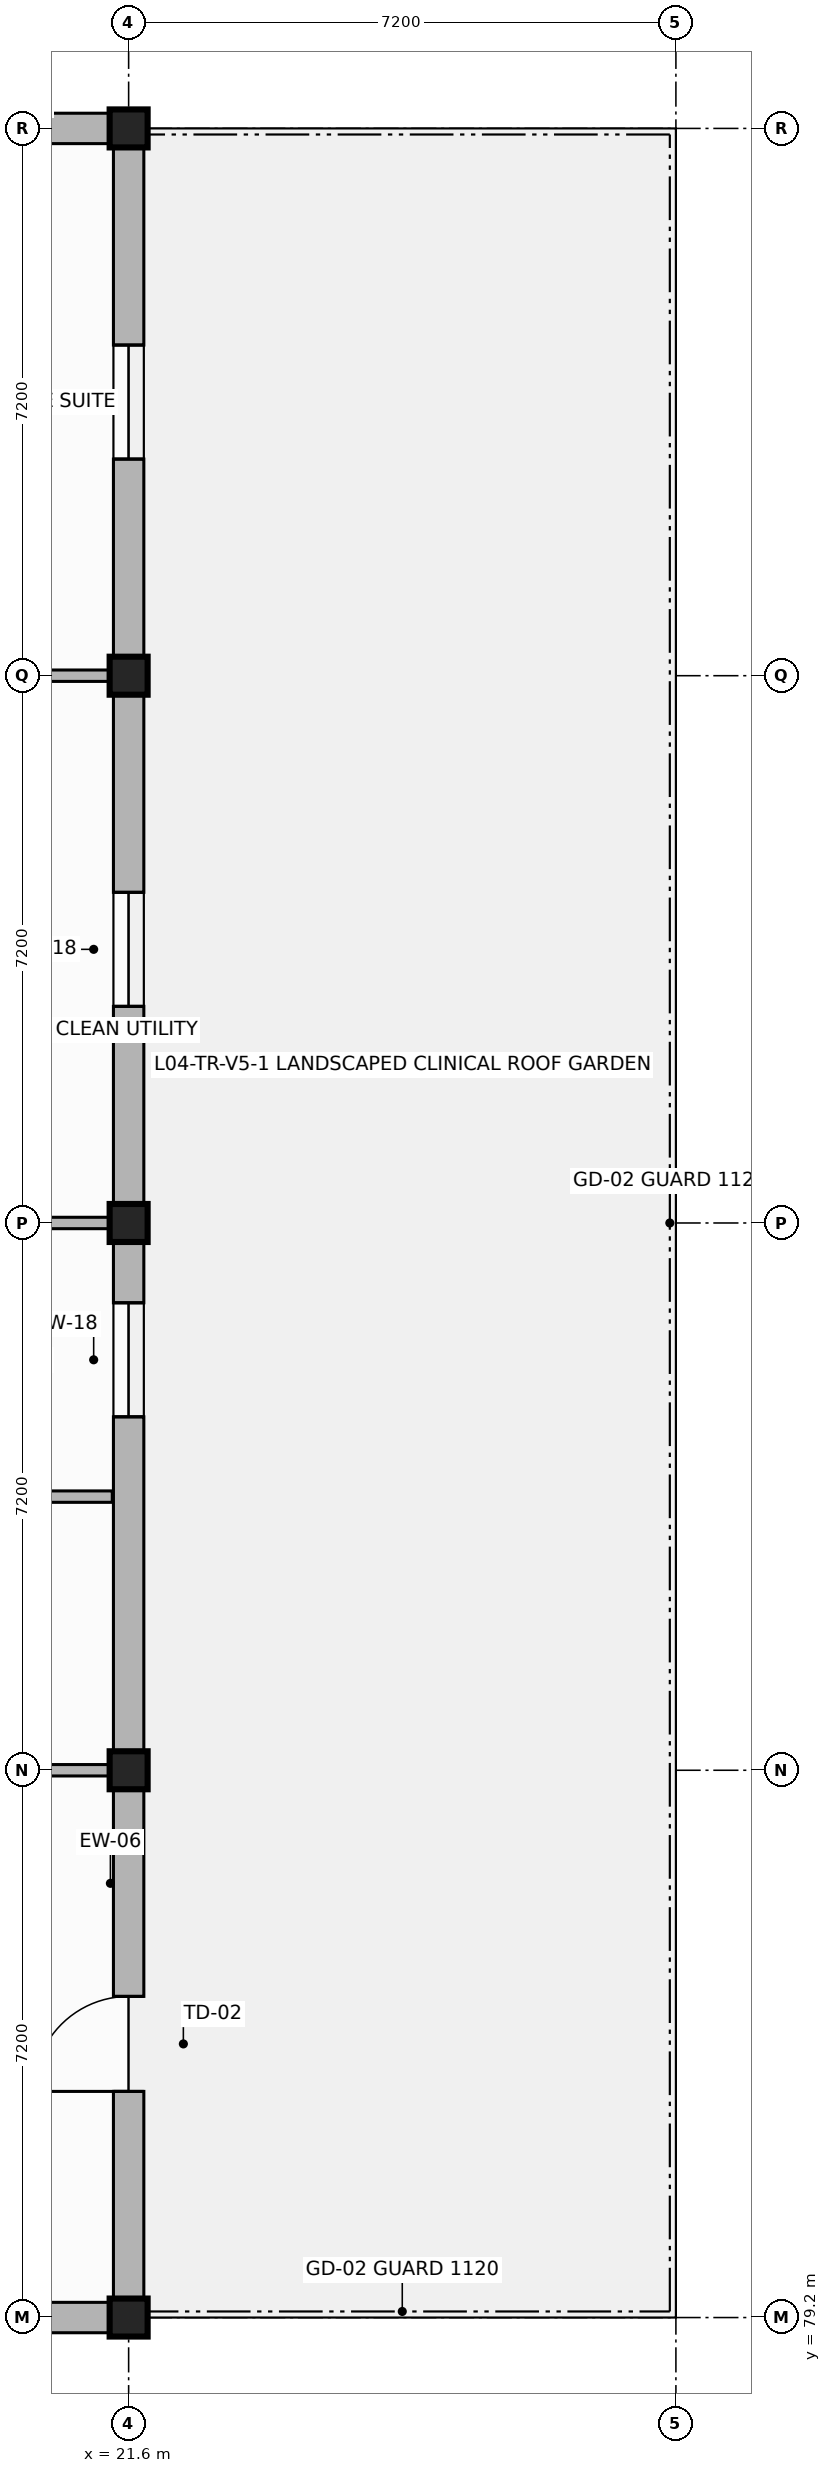
"""IFC4 building model, lengths in metres.
Left out: names, types, materials, properties, quantities, classifications, styles, units other than length and angle.
Written with IfcOpenShell. Run it as: python <this file> out.ifc"""

import sys

from ifc_helpers import new_model, si_unit, direction, frame, frame_2d, origin, origin_2d, place, context, subcontext, project, spatial, rectangle, extrude, element, fill, save


model = new_model("IFC4")
c1 = context("Model", 3, precision=1e-05, world=origin(), true_north=direction((0.0, 1.0)))
c2 = subcontext(c1, "Body", "Model", "MODEL_VIEW")
j1 = project(units=[si_unit("LENGTHUNIT", "METRE"), si_unit("PLANEANGLEUNIT", "RADIAN")], contexts=[c1])
p1 = place(None, origin())
s1 = spatial("IfcSite", under=j1, at=p1, CompositionType="ELEMENT")
p2 = place(p1, origin())
s2 = spatial("IfcBuilding", under=s1, at=p2, CompositionType="ELEMENT")
p3 = place(p2, frame((0.0, 0.0, 16.0)))
s3 = spatial("IfcBuildingStorey", under=s2, at=p3, CompositionType="ELEMENT", Elevation=16.0)
for number, where, z_axis, x_axis in (
    (1, (21.6, 79.2, 0.0), (0.0, 0.0, 1.0), (1.0, 0.0, 0.0)),
    (2, (21.6, 86.4, 0.0), (0.0, 0.0, 1.0), (1.0, 0.0, 0.0)),
    (3, (21.6, 93.6, 0.0), (0.0, 0.0, 1.0), (1.0, 0.0, 0.0)),
    (4, (21.6, 100.8, 0.0), (0.0, 0.0, 1.0), (1.0, 0.0, 0.0)),
    (5, (21.6, 108.0, 0.0), (0.0, 0.0, 1.0), (1.0, 0.0, 0.0)),
):
    element("IfcColumn", number, at=place(p3, frame(where, z_axis=z_axis, x_axis=x_axis)), inside=s3, PredefinedType="COLUMN", context=c2, shape_type="SweptSolid", body=[
        extrude(rectangle(XDim=0.5, YDim=0.5, at=origin_2d()), origin(), (0.0, 0.0, 1.0), 3.46),
    ])
p4 = place(p3, frame((14.4, 79.2, 0.0), z_axis=(0.0, 0.0, 1.0), x_axis=(1.0, 0.0, 0.0)))
e6 = element("IfcWall", 6, at=p4, inside=s3, PredefinedType="SOLIDWALL", context=c2, shape_type="SweptSolid", body=[
    extrude(rectangle(XDim=7.2, YDim=0.4, at=frame_2d((3.6, 0.0))), origin(), (0.0, 0.0, 1.0), 2.79),
])
p5 = place(p4, frame((2.85, 0.0, 0.9)))
e7 = element("IfcOpeningElement", 7, at=p5, cuts=e6, PredefinedType="OPENING", context=c2, shape_type="SweptSolid", body=[
    extrude(rectangle(XDim=1.5, YDim=1.6, at=frame_2d((0.75, 0.8))), frame((0.0, 0.21, 0.0), z_axis=(0.0, -1.0, 0.0), x_axis=(1.0, 0.0, 0.0)), (0.0, 0.0, 1.0), 0.42),
])
p6 = place(p3, frame((21.6, 79.2, 0.0), z_axis=(0.0, 0.0, 1.0), x_axis=(0.0, 1.0, 0.0)))
e8 = element("IfcWall", 8, at=p6, inside=s3, PredefinedType="SOLIDWALL", context=c2, shape_type="SweptSolid", body=[
    extrude(rectangle(XDim=7.2, YDim=0.4, at=frame_2d((3.6, 0.0))), origin(), (0.0, 0.0, 1.0), 2.79),
])
p7 = place(p6, frame((2.975, 0.0, 0.0)))
e9 = element("IfcOpeningElement", 9, at=p7, cuts=e8, PredefinedType="OPENING", context=c2, shape_type="SweptSolid", body=[
    extrude(rectangle(XDim=1.25, YDim=2.25, at=frame_2d((0.625, 1.125))), frame((0.0, 0.21, 0.0), z_axis=(0.0, -1.0, 0.0), x_axis=(1.0, 0.0, 0.0)), (0.0, 0.0, 1.0), 0.42),
])
p8 = place(p3, frame((21.6, 86.4, 0.0), z_axis=(0.0, 0.0, 1.0), x_axis=(0.0, 1.0, 0.0)))
e10 = element("IfcWall", 10, at=p8, inside=s3, PredefinedType="SOLIDWALL", context=c2, shape_type="SweptSolid", body=[
    extrude(rectangle(XDim=7.2, YDim=0.4, at=frame_2d((3.6, 0.0))), origin(), (0.0, 0.0, 1.0), 2.79),
])
p9 = place(p8, frame((4.65, 0.0, 0.9)))
e11 = element("IfcOpeningElement", 11, at=p9, cuts=e10, PredefinedType="OPENING", context=c2, shape_type="SweptSolid", body=[
    extrude(rectangle(XDim=1.5, YDim=1.6, at=frame_2d((0.75, 0.8))), frame((0.0, 0.21, 0.0), z_axis=(0.0, -1.0, 0.0), x_axis=(1.0, 0.0, 0.0)), (0.0, 0.0, 1.0), 0.42),
])
p10 = place(p3, frame((21.6, 93.6, 0.0), z_axis=(0.0, 0.0, 1.0), x_axis=(0.0, 1.0, 0.0)))
e12 = element("IfcWall", 12, at=p10, inside=s3, PredefinedType="SOLIDWALL", context=c2, shape_type="SweptSolid", body=[
    extrude(rectangle(XDim=7.2, YDim=0.4, at=frame_2d((3.6, 0.0))), origin(), (0.0, 0.0, 1.0), 2.79),
])
p11 = place(p10, frame((2.85, 0.0, 0.9)))
e13 = element("IfcOpeningElement", 13, at=p11, cuts=e12, PredefinedType="OPENING", context=c2, shape_type="SweptSolid", body=[
    extrude(rectangle(XDim=1.5, YDim=1.6, at=frame_2d((0.75, 0.8))), frame((0.0, 0.21, 0.0), z_axis=(0.0, -1.0, 0.0), x_axis=(1.0, 0.0, 0.0)), (0.0, 0.0, 1.0), 0.42),
])
p12 = place(p3, frame((21.6, 100.8, 0.0), z_axis=(0.0, 0.0, 1.0), x_axis=(0.0, 1.0, 0.0)))
e14 = element("IfcWall", 14, at=p12, inside=s3, PredefinedType="SOLIDWALL", context=c2, shape_type="SweptSolid", body=[
    extrude(rectangle(XDim=7.2, YDim=0.4, at=frame_2d((3.6, 0.0))), origin(), (0.0, 0.0, 1.0), 2.79),
])
p13 = place(p12, frame((2.85, 0.0, 0.9)))
e15 = element("IfcOpeningElement", 15, at=p13, cuts=e14, PredefinedType="OPENING", context=c2, shape_type="SweptSolid", body=[
    extrude(rectangle(XDim=1.5, YDim=1.6, at=frame_2d((0.75, 0.8))), frame((0.0, 0.21, 0.0), z_axis=(0.0, -1.0, 0.0), x_axis=(1.0, 0.0, 0.0)), (0.0, 0.0, 1.0), 0.42),
])
p14 = place(p3, frame((21.6, 108.0, 0.0), z_axis=(0.0, 0.0, 1.0), x_axis=(-1.0, 0.0, 0.0)))
e16 = element("IfcWall", 16, at=p14, inside=s3, PredefinedType="SOLIDWALL", context=c2, shape_type="SweptSolid", body=[
    extrude(rectangle(XDim=7.2, YDim=0.4, at=frame_2d((3.6, 0.0))), origin(), (0.0, 0.0, 1.0), 2.79),
])
p15 = place(p14, frame((2.85, 0.0, 0.9)))
e17 = element("IfcOpeningElement", 17, at=p15, cuts=e16, PredefinedType="OPENING", context=c2, shape_type="SweptSolid", body=[
    extrude(rectangle(XDim=1.5, YDim=1.6, at=frame_2d((0.75, 0.8))), frame((0.0, 0.21, 0.0), z_axis=(0.0, -1.0, 0.0), x_axis=(1.0, 0.0, 0.0)), (0.0, 0.0, 1.0), 0.42),
])
for number, where, z_axis, x_axis in (
    (18, (13.294, 86.4, 0.0), (0.0, 0.0, 1.0), (1.0, 0.0, 0.0)),
    (19, (13.294, 90.0, 0.0), (0.0, 0.0, 1.0), (1.0, 0.0, 0.0)),
):
    element("IfcWall", number, at=place(p3, frame(where, z_axis=z_axis, x_axis=x_axis)), inside=s3, PredefinedType="PARTITIONING", context=c2, shape_type="SweptSolid", body=[
        extrude(rectangle(XDim=8.091, YDim=0.15, at=frame_2d((4.045, 0.0))), origin(), (0.0, 0.0, 1.0), 2.78),
    ])
p16 = place(p3, frame((16.812, 93.6, 0.0), z_axis=(0.0, 0.0, 1.0), x_axis=(1.0, 0.0, 0.0)))
e20 = element("IfcWall", 20, at=p16, inside=s3, PredefinedType="PARTITIONING", context=c2, shape_type="SweptSolid", body=[
    extrude(rectangle(XDim=4.573, YDim=0.15, at=frame_2d((2.287, 0.0))), origin(), (0.0, 0.0, 1.0), 2.78),
])
p17 = place(p3, frame((13.294, 100.8, 0.0), z_axis=(0.0, 0.0, 1.0), x_axis=(1.0, 0.0, 0.0)))
e21 = element("IfcWall", 21, at=p17, inside=s3, PredefinedType="PARTITIONING", context=c2, shape_type="SweptSolid", body=[
    extrude(rectangle(XDim=8.091, YDim=0.15, at=frame_2d((4.045, 0.0))), origin(), (0.0, 0.0, 1.0), 2.78),
])
p18 = place(p7, origin())
e22 = element("IfcDoor", 22, at=p18, inside=s3, OperationType="SINGLE_SWING_LEFT", PredefinedType="DOOR", context=c2, shape_type="SweptSolid", body=[
    extrude(rectangle(XDim=1.25, YDim=2.25, at=frame_2d((0.625, 1.125))), frame((0.0, 0.025, 0.0), z_axis=(0.0, -1.0, 0.0), x_axis=(1.0, 0.0, 0.0)), (0.0, 0.0, 1.0), 0.05),
])
fill(e9, e22)
p19 = place(p9, origin())
e23 = element("IfcWindow", 23, at=p19, inside=s3, PartitioningType="SINGLE_PANEL", PredefinedType="WINDOW", context=c2, shape_type="SweptSolid", body=[
    extrude(rectangle(XDim=1.5, YDim=1.6, at=frame_2d((0.75, 0.8))), frame((0.0, 0.03, 0.0), z_axis=(0.0, -1.0, 0.0), x_axis=(1.0, 0.0, 0.0)), (0.0, 0.0, 1.0), 0.06),
])
fill(e11, e23)
p20 = place(p11, origin())
e24 = element("IfcWindow", 24, at=p20, inside=s3, PartitioningType="SINGLE_PANEL", PredefinedType="WINDOW", context=c2, shape_type="SweptSolid", body=[
    extrude(rectangle(XDim=1.5, YDim=1.6, at=frame_2d((0.75, 0.8))), frame((0.0, 0.03, 0.0), z_axis=(0.0, -1.0, 0.0), x_axis=(1.0, 0.0, 0.0)), (0.0, 0.0, 1.0), 0.06),
])
fill(e13, e24)
p21 = place(p13, origin())
e25 = element("IfcWindow", 25, at=p21, inside=s3, PartitioningType="SINGLE_PANEL", PredefinedType="WINDOW", context=c2, shape_type="SweptSolid", body=[
    extrude(rectangle(XDim=1.5, YDim=1.6, at=frame_2d((0.75, 0.8))), frame((0.0, 0.03, 0.0), z_axis=(0.0, -1.0, 0.0), x_axis=(1.0, 0.0, 0.0)), (0.0, 0.0, 1.0), 0.06),
])
fill(e15, e25)
save(model, sys.argv[1])
